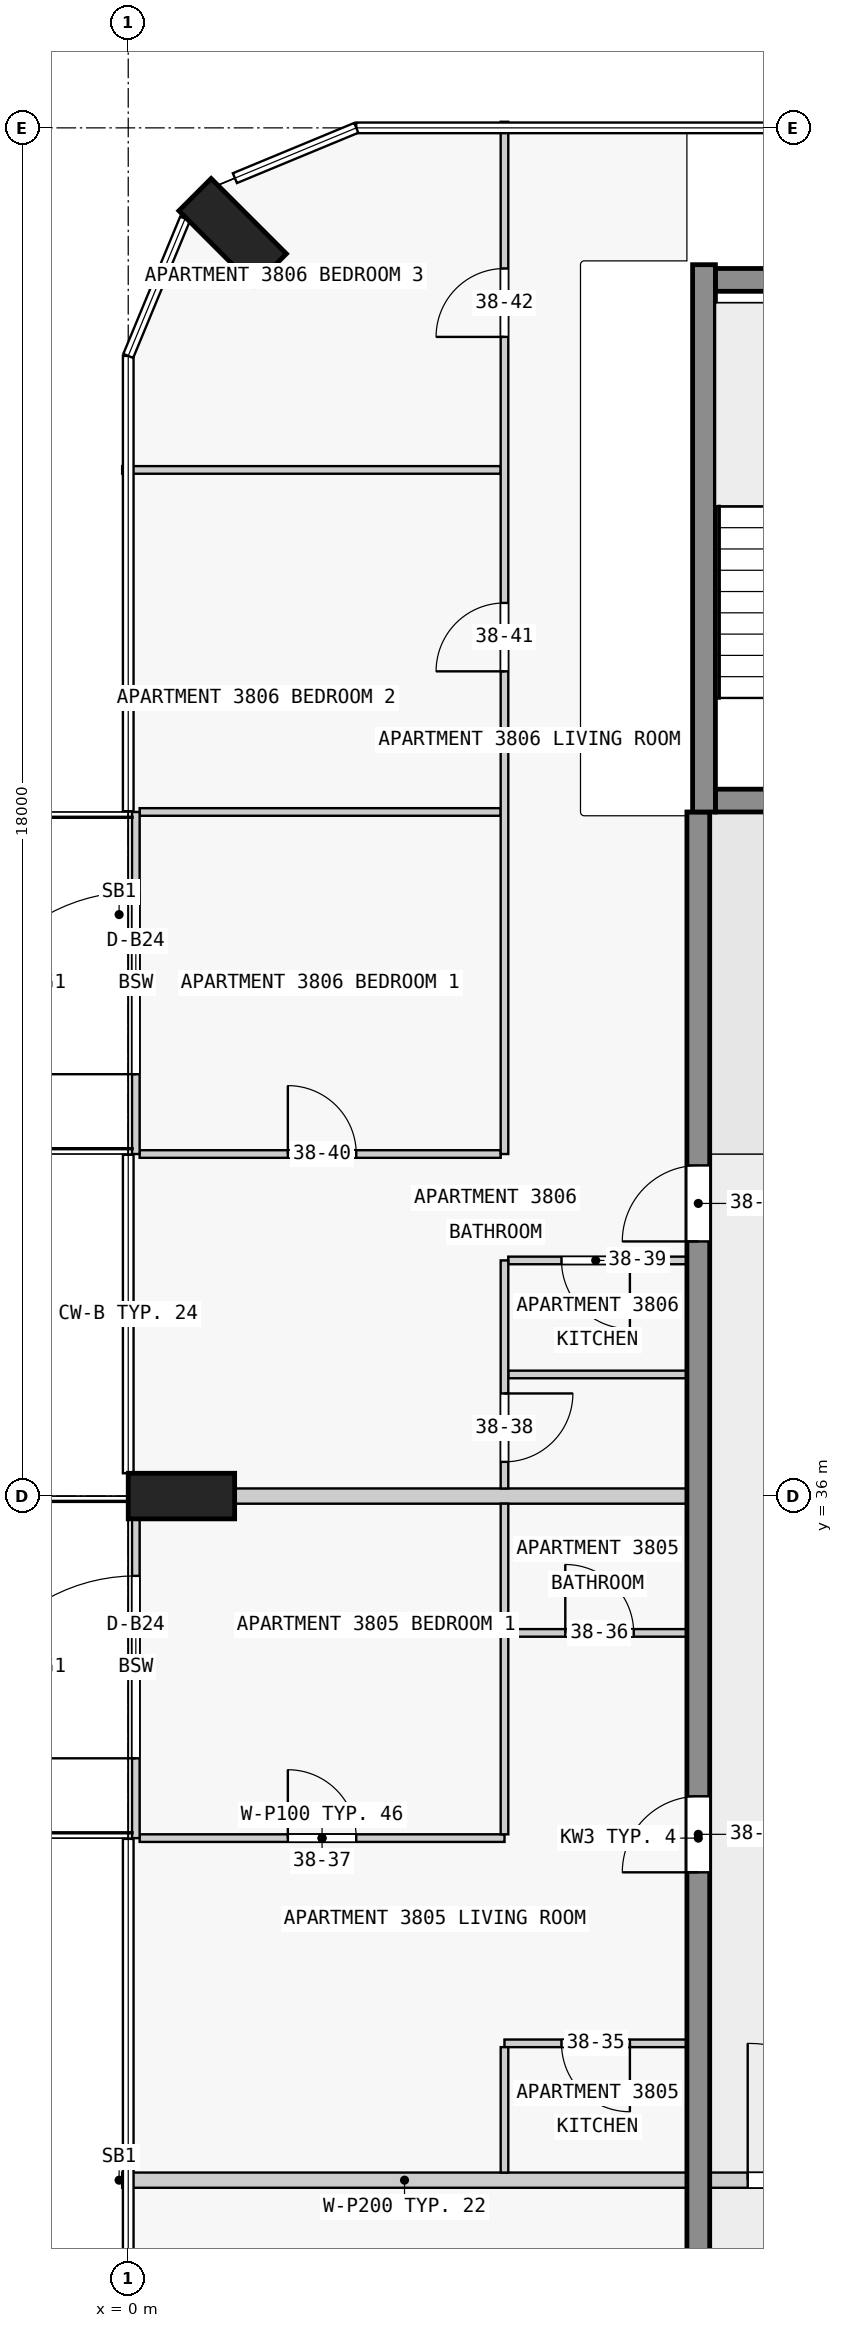
"""IFC4 building model, lengths in metres.
Left out: names, types, materials, properties, quantities, classifications, styles, units other than length and angle.
Written with IfcOpenShell. Run it as: python <this file> out.ifc"""

import sys

from ifc_helpers import new_model, si_unit, direction, frame, frame_2d, origin, origin_2d, place, context, subcontext, project, spatial, rectangle, extrude, element, fill, save


model = new_model("IFC4")
c1 = context("Model", 3, precision=1e-05, world=origin(), true_north=direction((0.0, 1.0)))
c2 = subcontext(c1, "Body", "Model", "MODEL_VIEW")
j1 = project(units=[si_unit("LENGTHUNIT", "METRE"), si_unit("PLANEANGLEUNIT", "RADIAN")], contexts=[c1])
p1 = place(None, origin())
s1 = spatial("IfcSite", under=j1, at=p1, CompositionType="ELEMENT")
p2 = place(p1, origin())
s2 = spatial("IfcBuilding", under=s1, at=p2, CompositionType="ELEMENT")
p3 = place(p2, frame((0.0, 0.0, 149.9)))
s3 = spatial("IfcBuildingStorey", under=s2, at=p3, CompositionType="ELEMENT", Elevation=149.9)
for number, where, z_axis, x_axis in (
    (1, (1.374, 52.626, 0.0), (0.0, 0.0, 1.0), (0.707, 0.707, 0.0)),
    (2, (0.7, 36.0, 0.0), (0.0, 0.0, 1.0), (0.0, 1.0, 0.0)),
):
    element("IfcColumn", number, at=place(p3, frame(where, z_axis=z_axis, x_axis=x_axis)), inside=s3, PredefinedType="COLUMN", context=c2, shape_type="SweptSolid", body=[
        extrude(rectangle(XDim=0.6, YDim=1.4, at=origin_2d()), origin(), (0.0, 0.0, 1.0), 3.5),
    ])
p4 = place(p3, frame((7.725, 45.15, 0.0), z_axis=(0.0, 0.0, 1.0), x_axis=(1.0, 0.0, 0.0)))
e3 = element("IfcWall", 3, at=p4, inside=s3, PredefinedType="SHEAR", context=c2, shape_type="SweptSolid", body=[
    extrude(rectangle(XDim=2.55, YDim=0.3, at=frame_2d((1.275, 0.0))), origin(), (0.0, 0.0, 1.0), 3.5),
])
p5 = place(p4, frame((0.725, 0.0, 0.0)))
e4 = element("IfcOpeningElement", 4, at=p5, cuts=e3, PredefinedType="OPENING", context=c2, shape_type="SweptSolid", body=[
    extrude(rectangle(XDim=1.1, YDim=2.1, at=frame_2d((0.55, 1.05))), frame((0.0, 0.16, 0.0), z_axis=(0.0, -1.0, 0.0), x_axis=(1.0, 0.0, 0.0)), (0.0, 0.0, 1.0), 0.32),
])
p6 = place(p3, frame((7.725, 52.0, 0.0), z_axis=(0.0, 0.0, 1.0), x_axis=(1.0, 0.0, 0.0)))
e5 = element("IfcWall", 5, at=p6, inside=s3, PredefinedType="SHEAR", context=c2, shape_type="SweptSolid", body=[
    extrude(rectangle(XDim=2.55, YDim=0.3, at=frame_2d((1.275, 0.0))), origin(), (0.0, 0.0, 1.0), 3.5),
])
p7 = place(p3, frame((7.575, 45.0, 0.0), z_axis=(0.0, 0.0, 1.0), x_axis=(0.0, 1.0, 0.0)))
e6 = element("IfcWall", 6, at=p7, inside=s3, PredefinedType="SHEAR", context=c2, shape_type="SweptSolid", body=[
    extrude(rectangle(XDim=7.2, YDim=0.3, at=frame_2d((3.6, 0.0))), origin(), (0.0, 0.0, 1.0), 3.5),
])
p8 = place(p3, frame((7.5, 18.0, 0.0), z_axis=(0.0, 0.0, 1.0), x_axis=(0.0, 1.0, 0.0)))
e7 = element("IfcWall", 7, at=p8, inside=s3, PredefinedType="SHEAR", context=c2, shape_type="SweptSolid", body=[
    extrude(rectangle(XDim=27.0, YDim=0.3, at=frame_2d((13.5, 0.0))), origin(), (0.0, 0.0, 1.0), 3.25),
])
p9 = place(p8, frame((1.75, 0.0, 0.0)))
e8 = element("IfcOpeningElement", 8, at=p9, cuts=e7, PredefinedType="OPENING", context=c2, shape_type="SweptSolid", body=[
    extrude(rectangle(XDim=1.0, YDim=2.1, at=frame_2d((0.5, 1.05))), frame((0.0, 0.16, 0.0), z_axis=(0.0, -1.0, 0.0), x_axis=(1.0, 0.0, 0.0)), (0.0, 0.0, 1.0), 0.32),
])
p10 = place(p8, frame((5.85, 0.0, 0.0)))
e9 = element("IfcOpeningElement", 9, at=p10, cuts=e7, PredefinedType="OPENING", context=c2, shape_type="SweptSolid", body=[
    extrude(rectangle(XDim=1.8, YDim=2.1, at=frame_2d((0.9, 1.05))), frame((0.0, 0.16, 0.0), z_axis=(0.0, -1.0, 0.0), x_axis=(1.0, 0.0, 0.0)), (0.0, 0.0, 1.0), 0.32),
])
p11 = place(p8, frame((13.05, 0.0, 0.0)))
e10 = element("IfcOpeningElement", 10, at=p11, cuts=e7, PredefinedType="OPENING", context=c2, shape_type="SweptSolid", body=[
    extrude(rectangle(XDim=1.0, YDim=2.1, at=frame_2d((0.5, 1.05))), frame((0.0, 0.16, 0.0), z_axis=(0.0, -1.0, 0.0), x_axis=(1.0, 0.0, 0.0)), (0.0, 0.0, 1.0), 0.32),
])
p12 = place(p8, frame((21.35, 0.0, 0.0)))
e11 = element("IfcOpeningElement", 11, at=p12, cuts=e7, PredefinedType="OPENING", context=c2, shape_type="SweptSolid", body=[
    extrude(rectangle(XDim=1.0, YDim=2.1, at=frame_2d((0.5, 1.05))), frame((0.0, 0.16, 0.0), z_axis=(0.0, -1.0, 0.0), x_axis=(1.0, 0.0, 0.0)), (0.0, 0.0, 1.0), 0.32),
])
p13 = place(p3, frame((0.1, 31.5, 0.0), z_axis=(0.0, 0.0, 1.0), x_axis=(0.0, 1.0, 0.0)))
e12 = element("IfcWall", 12, at=p13, inside=s3, PredefinedType="STANDARD", context=c2, shape_type="SweptSolid", body=[
    extrude(rectangle(XDim=4.5, YDim=0.1, at=frame_2d((2.25, 0.0))), origin(), (0.0, 0.0, 1.0), 3.25),
])
p14 = place(p13, frame((1.05, 0.0, 0.0)))
e13 = element("IfcOpeningElement", 13, at=p14, cuts=e12, PredefinedType="OPENING", context=c2, shape_type="SweptSolid", body=[
    extrude(rectangle(XDim=2.4, YDim=2.4, at=frame_2d((1.2, 1.2))), frame((0.0, 0.06, 0.0), z_axis=(0.0, -1.0, 0.0), x_axis=(1.0, 0.0, 0.0)), (0.0, 0.0, 1.0), 0.12),
])
p15 = place(p3, frame((0.1, 40.5, 0.0), z_axis=(0.0, 0.0, 1.0), x_axis=(0.0, 1.0, 0.0)))
e14 = element("IfcWall", 14, at=p15, inside=s3, PredefinedType="STANDARD", context=c2, shape_type="SweptSolid", body=[
    extrude(rectangle(XDim=4.5, YDim=0.1, at=frame_2d((2.25, 0.0))), origin(), (0.0, 0.0, 1.0), 3.25),
])
p16 = place(p15, frame((1.05, 0.0, 0.0)))
e15 = element("IfcOpeningElement", 15, at=p16, cuts=e14, PredefinedType="OPENING", context=c2, shape_type="SweptSolid", body=[
    extrude(rectangle(XDim=2.4, YDim=2.4, at=frame_2d((1.2, 1.2))), frame((0.0, 0.06, 0.0), z_axis=(0.0, -1.0, 0.0), x_axis=(1.0, 0.0, 0.0)), (0.0, 0.0, 1.0), 0.12),
])
p17 = place(p3, frame((7.35, 27.0, 0.0), z_axis=(0.0, 0.0, 1.0), x_axis=(-1.0, 0.0, 0.0)))
e16 = element("IfcWall", 16, at=p17, inside=s3, PredefinedType="PARTITIONING", context=c2, shape_type="SweptSolid", body=[
    extrude(rectangle(XDim=7.43, YDim=0.2, at=frame_2d((3.715, 0.0))), origin(), (0.0, 0.0, 1.0), 3.25),
])
p18 = place(p3, frame((7.35, 28.8, 0.0), z_axis=(0.0, 0.0, 1.0), x_axis=(-1.0, 0.0, 0.0)))
e17 = element("IfcWall", 17, at=p18, inside=s3, PredefinedType="PARTITIONING", context=c2, shape_type="SweptSolid", body=[
    extrude(rectangle(XDim=2.4, YDim=0.1, at=frame_2d((1.2, 0.0))), origin(), (0.0, 0.0, 1.0), 3.25),
])
p19 = place(p18, frame((0.75, 0.0, 0.0)))
e18 = element("IfcOpeningElement", 18, at=p19, cuts=e17, PredefinedType="OPENING", context=c2, shape_type="SweptSolid", body=[
    extrude(rectangle(XDim=0.9, YDim=2.1, at=frame_2d((0.45, 1.05))), frame((0.0, 0.06, 0.0), z_axis=(0.0, -1.0, 0.0), x_axis=(1.0, 0.0, 0.0)), (0.0, 0.0, 1.0), 0.12),
])
p20 = place(p3, frame((0.15, 31.5, 0.0), z_axis=(0.0, 0.0, 1.0), x_axis=(1.0, 0.0, 0.0)))
e19 = element("IfcWall", 19, at=p20, inside=s3, PredefinedType="PARTITIONING", context=c2, shape_type="SweptSolid", body=[
    extrude(rectangle(XDim=4.8, YDim=0.1, at=frame_2d((2.4, 0.0))), origin(), (0.0, 0.0, 1.0), 3.25),
])
p21 = place(p20, frame((1.95, 0.0, 0.0)))
e20 = element("IfcOpeningElement", 20, at=p21, cuts=e19, PredefinedType="OPENING", context=c2, shape_type="SweptSolid", body=[
    extrude(rectangle(XDim=0.9, YDim=2.1, at=frame_2d((0.45, 1.05))), frame((0.0, 0.06, 0.0), z_axis=(0.0, -1.0, 0.0), x_axis=(1.0, 0.0, 0.0)), (0.0, 0.0, 1.0), 0.12),
])
p22 = place(p3, frame((5.0, 34.2, 0.0), z_axis=(0.0, 0.0, 1.0), x_axis=(1.0, 0.0, 0.0)))
e21 = element("IfcWall", 21, at=p22, inside=s3, PredefinedType="PARTITIONING", context=c2, shape_type="SweptSolid", body=[
    extrude(rectangle(XDim=2.35, YDim=0.1, at=frame_2d((1.175, 0.0))), origin(), (0.0, 0.0, 1.0), 3.25),
])
p23 = place(p22, frame((0.75, 0.0, 0.0)))
e22 = element("IfcOpeningElement", 22, at=p23, cuts=e21, PredefinedType="OPENING", context=c2, shape_type="SweptSolid", body=[
    extrude(rectangle(XDim=0.9, YDim=2.1, at=frame_2d((0.45, 1.05))), frame((0.0, 0.06, 0.0), z_axis=(0.0, -1.0, 0.0), x_axis=(1.0, 0.0, 0.0)), (0.0, 0.0, 1.0), 0.12),
])
p24 = place(p3, frame((7.35, 36.0, 0.0), z_axis=(0.0, 0.0, 1.0), x_axis=(-1.0, 0.0, 0.0)))
e23 = element("IfcWall", 23, at=p24, inside=s3, PredefinedType="PARTITIONING", context=c2, shape_type="SweptSolid", body=[
    extrude(rectangle(XDim=5.95, YDim=0.2, at=frame_2d((2.975, 0.0))), origin(), (0.0, 0.0, 1.0), 3.25),
])
p25 = place(p3, frame((7.35, 37.6, 0.0), z_axis=(0.0, 0.0, 1.0), x_axis=(-1.0, 0.0, 0.0)))
e24 = element("IfcWall", 24, at=p25, inside=s3, PredefinedType="PARTITIONING", context=c2, shape_type="SweptSolid", body=[
    extrude(rectangle(XDim=2.35, YDim=0.1, at=frame_2d((1.175, 0.0))), origin(), (0.0, 0.0, 1.0), 3.25),
])
p26 = place(p3, frame((7.35, 39.1, 0.0), z_axis=(0.0, 0.0, 1.0), x_axis=(-1.0, 0.0, 0.0)))
e25 = element("IfcWall", 25, at=p26, inside=s3, PredefinedType="PARTITIONING", context=c2, shape_type="SweptSolid", body=[
    extrude(rectangle(XDim=2.35, YDim=0.1, at=frame_2d((1.175, 0.0))), origin(), (0.0, 0.0, 1.0), 3.25),
])
p27 = place(p26, frame((0.75, 0.0, 0.0)))
e26 = element("IfcOpeningElement", 26, at=p27, cuts=e25, PredefinedType="OPENING", context=c2, shape_type="SweptSolid", body=[
    extrude(rectangle(XDim=0.9, YDim=2.1, at=frame_2d((0.45, 1.05))), frame((0.0, 0.06, 0.0), z_axis=(0.0, -1.0, 0.0), x_axis=(1.0, 0.0, 0.0)), (0.0, 0.0, 1.0), 0.12),
])
p28 = place(p3, frame((0.15, 40.5, 0.0), z_axis=(0.0, 0.0, 1.0), x_axis=(1.0, 0.0, 0.0)))
e27 = element("IfcWall", 27, at=p28, inside=s3, PredefinedType="PARTITIONING", context=c2, shape_type="SweptSolid", body=[
    extrude(rectangle(XDim=4.75, YDim=0.1, at=frame_2d((2.375, 0.0))), origin(), (0.0, 0.0, 1.0), 3.25),
])
p29 = place(p28, frame((1.95, 0.0, 0.0)))
e28 = element("IfcOpeningElement", 28, at=p29, cuts=e27, PredefinedType="OPENING", context=c2, shape_type="SweptSolid", body=[
    extrude(rectangle(XDim=0.9, YDim=2.1, at=frame_2d((0.45, 1.05))), frame((0.0, 0.06, 0.0), z_axis=(0.0, -1.0, 0.0), x_axis=(1.0, 0.0, 0.0)), (0.0, 0.0, 1.0), 0.12),
])
p30 = place(p3, frame((4.9, 45.0, 0.0), z_axis=(0.0, 0.0, 1.0), x_axis=(-1.0, 0.0, 0.0)))
e29 = element("IfcWall", 29, at=p30, inside=s3, PredefinedType="PARTITIONING", context=c2, shape_type="SweptSolid", body=[
    extrude(rectangle(XDim=4.75, YDim=0.1, at=frame_2d((2.375, 0.0))), origin(), (0.0, 0.0, 1.0), 3.25),
])
p31 = place(p3, frame((4.9, 49.5, 0.0), z_axis=(0.0, 0.0, 1.0), x_axis=(-1.0, 0.0, 0.0)))
e30 = element("IfcWall", 30, at=p31, inside=s3, PredefinedType="PARTITIONING", context=c2, shape_type="SweptSolid", body=[
    extrude(rectangle(XDim=4.98, YDim=0.1, at=frame_2d((2.49, 0.0))), origin(), (0.0, 0.0, 1.0), 3.25),
])
p32 = place(p3, frame((4.95, 28.75, 0.0), z_axis=(0.0, 0.0, 1.0), x_axis=(0.0, -1.0, 0.0)))
e31 = element("IfcWall", 31, at=p32, inside=s3, PredefinedType="PARTITIONING", context=c2, shape_type="SweptSolid", body=[
    extrude(rectangle(XDim=1.65, YDim=0.1, at=frame_2d((0.825, 0.0))), origin(), (0.0, 0.0, 1.0), 3.25),
])
p33 = place(p3, frame((4.95, 35.9, 0.0), z_axis=(0.0, 0.0, 1.0), x_axis=(0.0, -1.0, 0.0)))
e32 = element("IfcWall", 32, at=p33, inside=s3, PredefinedType="PARTITIONING", context=c2, shape_type="SweptSolid", body=[
    extrude(rectangle(XDim=1.7, YDim=0.1, at=frame_2d((0.85, 0.0))), origin(), (0.0, 0.0, 1.0), 3.25),
])
p34 = place(p3, frame((4.95, 39.1, 0.0), z_axis=(0.0, 0.0, 1.0), x_axis=(0.0, -1.0, 0.0)))
e33 = element("IfcWall", 33, at=p34, inside=s3, PredefinedType="PARTITIONING", context=c2, shape_type="SweptSolid", body=[
    extrude(rectangle(XDim=3.0, YDim=0.1, at=frame_2d((1.5, 0.0))), origin(), (0.0, 0.0, 1.0), 3.25),
])
p35 = place(p34, frame((1.75, 0.0, 0.0)))
e34 = element("IfcOpeningElement", 34, at=p35, cuts=e33, PredefinedType="OPENING", context=c2, shape_type="SweptSolid", body=[
    extrude(rectangle(XDim=0.9, YDim=2.1, at=frame_2d((0.45, 1.05))), frame((0.0, 0.06, 0.0), z_axis=(0.0, -1.0, 0.0), x_axis=(1.0, 0.0, 0.0)), (0.0, 0.0, 1.0), 0.12),
])
p36 = place(p3, frame((4.95, 31.55, 0.0), z_axis=(0.0, 0.0, 1.0), x_axis=(0.0, 1.0, 0.0)))
e35 = element("IfcWall", 35, at=p36, inside=s3, PredefinedType="PARTITIONING", context=c2, shape_type="SweptSolid", body=[
    extrude(rectangle(XDim=2.6, YDim=0.1, at=frame_2d((1.3, 0.0))), origin(), (0.0, 0.0, 1.0), 3.25),
])
p37 = place(p3, frame((4.95, 40.5, 0.0), z_axis=(0.0, 0.0, 1.0), x_axis=(0.0, 1.0, 0.0)))
e36 = element("IfcWall", 36, at=p37, inside=s3, PredefinedType="PARTITIONING", context=c2, shape_type="SweptSolid", body=[
    extrude(rectangle(XDim=13.58, YDim=0.1, at=frame_2d((6.79, 0.0))), origin(), (0.0, 0.0, 1.0), 3.25),
])
p38 = place(p37, frame((6.35, 0.0, 0.0)))
e37 = element("IfcOpeningElement", 37, at=p38, cuts=e36, PredefinedType="OPENING", context=c2, shape_type="SweptSolid", body=[
    extrude(rectangle(XDim=0.9, YDim=2.1, at=frame_2d((0.45, 1.05))), frame((0.0, 0.06, 0.0), z_axis=(0.0, -1.0, 0.0), x_axis=(1.0, 0.0, 0.0)), (0.0, 0.0, 1.0), 0.12),
])
p39 = place(p37, frame((10.75, 0.0, 0.0)))
e38 = element("IfcOpeningElement", 38, at=p39, cuts=e36, PredefinedType="OPENING", context=c2, shape_type="SweptSolid", body=[
    extrude(rectangle(XDim=0.9, YDim=2.1, at=frame_2d((0.45, 1.05))), frame((0.0, 0.06, 0.0), z_axis=(0.0, -1.0, 0.0), x_axis=(1.0, 0.0, 0.0)), (0.0, 0.0, 1.0), 0.12),
])
p40 = place(p3, frame((7.45, 27.0, 0.0), z_axis=(0.0, 0.0, 1.0), x_axis=(1.0, 0.0, 0.0)))
e39 = element("IfcWall", 39, at=p40, inside=s3, PredefinedType="PARTITIONING", context=c2, shape_type="SweptSolid", body=[
    extrude(rectangle(XDim=3.2, YDim=0.2, at=frame_2d((1.6, 0.0))), origin(), (0.0, 0.0, 1.0), 3.25),
])
p41 = place(p40, frame((0.7, 0.0, 0.0)))
e40 = element("IfcOpeningElement", 40, at=p41, cuts=e39, PredefinedType="OPENING", context=c2, shape_type="SweptSolid", body=[
    extrude(rectangle(XDim=1.8, YDim=2.1, at=frame_2d((0.9, 1.05))), frame((0.0, 0.11, 0.0), z_axis=(0.0, -1.0, 0.0), x_axis=(1.0, 0.0, 0.0)), (0.0, 0.0, 1.0), 0.22),
])
p42 = place(p14, origin())
e41 = element("IfcDoor", 41, at=p42, inside=s3, OperationType="SINGLE_SWING_LEFT", PredefinedType="DOOR", context=c2, shape_type="SweptSolid", body=[
    extrude(rectangle(XDim=2.4, YDim=2.4, at=frame_2d((1.2, 1.2))), frame((0.0, 0.025, 0.0), z_axis=(0.0, -1.0, 0.0), x_axis=(1.0, 0.0, 0.0)), (0.0, 0.0, 1.0), 0.05),
])
fill(e13, e41)
p43 = place(p16, origin())
e42 = element("IfcDoor", 42, at=p43, inside=s3, OperationType="SINGLE_SWING_LEFT", PredefinedType="DOOR", context=c2, shape_type="SweptSolid", body=[
    extrude(rectangle(XDim=2.4, YDim=2.4, at=frame_2d((1.2, 1.2))), frame((0.0, 0.025, 0.0), z_axis=(0.0, -1.0, 0.0), x_axis=(1.0, 0.0, 0.0)), (0.0, 0.0, 1.0), 0.05),
])
fill(e15, e42)
p44 = place(p11, origin())
e43 = element("IfcDoor", 43, at=p44, inside=s3, OperationType="SINGLE_SWING_RIGHT", PredefinedType="DOOR", context=c2, shape_type="SweptSolid", body=[
    extrude(rectangle(XDim=1.0, YDim=2.1, at=frame_2d((0.5, 1.05))), frame((0.0, 0.025, 0.0), z_axis=(0.0, -1.0, 0.0), x_axis=(1.0, 0.0, 0.0)), (0.0, 0.0, 1.0), 0.05),
])
fill(e10, e43)
p45 = place(p12, origin())
e44 = element("IfcDoor", 44, at=p45, inside=s3, OperationType="SINGLE_SWING_RIGHT", PredefinedType="DOOR", context=c2, shape_type="SweptSolid", body=[
    extrude(rectangle(XDim=1.0, YDim=2.1, at=frame_2d((0.5, 1.05))), frame((0.0, 0.025, 0.0), z_axis=(0.0, -1.0, 0.0), x_axis=(1.0, 0.0, 0.0)), (0.0, 0.0, 1.0), 0.05),
])
fill(e11, e44)
p46 = place(p41, origin())
e45 = element("IfcDoor", 45, at=p46, inside=s3, OperationType="SINGLE_SWING_LEFT", PredefinedType="DOOR", context=c2, shape_type="SweptSolid", body=[
    extrude(rectangle(XDim=1.8, YDim=2.1, at=frame_2d((0.9, 1.05))), frame((0.0, 0.025, 0.0), z_axis=(0.0, -1.0, 0.0), x_axis=(1.0, 0.0, 0.0)), (0.0, 0.0, 1.0), 0.05),
])
fill(e40, e45)
p47 = place(p19, origin())
e46 = element("IfcDoor", 46, at=p47, inside=s3, OperationType="SINGLE_SWING_RIGHT", PredefinedType="DOOR", context=c2, shape_type="SweptSolid", body=[
    extrude(rectangle(XDim=0.9, YDim=2.1, at=frame_2d((0.45, 1.05))), frame((0.0, 0.025, 0.0), z_axis=(0.0, -1.0, 0.0), x_axis=(1.0, 0.0, 0.0)), (0.0, 0.0, 1.0), 0.05),
])
fill(e18, e46)
p48 = place(p23, origin())
e47 = element("IfcDoor", 47, at=p48, inside=s3, OperationType="SINGLE_SWING_RIGHT", PredefinedType="DOOR", context=c2, shape_type="SweptSolid", body=[
    extrude(rectangle(XDim=0.9, YDim=2.1, at=frame_2d((0.45, 1.05))), frame((0.0, 0.025, 0.0), z_axis=(0.0, -1.0, 0.0), x_axis=(1.0, 0.0, 0.0)), (0.0, 0.0, 1.0), 0.05),
])
fill(e22, e47)
p49 = place(p21, origin())
e48 = element("IfcDoor", 48, at=p49, inside=s3, OperationType="SINGLE_SWING_LEFT", PredefinedType="DOOR", context=c2, shape_type="SweptSolid", body=[
    extrude(rectangle(XDim=0.9, YDim=2.1, at=frame_2d((0.45, 1.05))), frame((0.0, 0.025, 0.0), z_axis=(0.0, -1.0, 0.0), x_axis=(1.0, 0.0, 0.0)), (0.0, 0.0, 1.0), 0.05),
])
fill(e20, e48)
p50 = place(p35, origin())
e49 = element("IfcDoor", 49, at=p50, inside=s3, OperationType="SINGLE_SWING_RIGHT", PredefinedType="DOOR", context=c2, shape_type="SweptSolid", body=[
    extrude(rectangle(XDim=0.9, YDim=2.1, at=frame_2d((0.45, 1.05))), frame((0.0, 0.025, 0.0), z_axis=(0.0, -1.0, 0.0), x_axis=(1.0, 0.0, 0.0)), (0.0, 0.0, 1.0), 0.05),
])
fill(e34, e49)
p51 = place(p27, origin())
e50 = element("IfcDoor", 50, at=p51, inside=s3, OperationType="SINGLE_SWING_RIGHT", PredefinedType="DOOR", context=c2, shape_type="SweptSolid", body=[
    extrude(rectangle(XDim=0.9, YDim=2.1, at=frame_2d((0.45, 1.05))), frame((0.0, 0.025, 0.0), z_axis=(0.0, -1.0, 0.0), x_axis=(1.0, 0.0, 0.0)), (0.0, 0.0, 1.0), 0.05),
])
fill(e26, e50)
p52 = place(p29, origin())
e51 = element("IfcDoor", 51, at=p52, inside=s3, OperationType="SINGLE_SWING_RIGHT", PredefinedType="DOOR", context=c2, shape_type="SweptSolid", body=[
    extrude(rectangle(XDim=0.9, YDim=2.1, at=frame_2d((0.45, 1.05))), frame((0.0, 0.025, 0.0), z_axis=(0.0, -1.0, 0.0), x_axis=(1.0, 0.0, 0.0)), (0.0, 0.0, 1.0), 0.05),
])
fill(e28, e51)
p53 = place(p38, origin())
e52 = element("IfcDoor", 52, at=p53, inside=s3, OperationType="SINGLE_SWING_RIGHT", PredefinedType="DOOR", context=c2, shape_type="SweptSolid", body=[
    extrude(rectangle(XDim=0.9, YDim=2.1, at=frame_2d((0.45, 1.05))), frame((0.0, 0.025, 0.0), z_axis=(0.0, -1.0, 0.0), x_axis=(1.0, 0.0, 0.0)), (0.0, 0.0, 1.0), 0.05),
])
fill(e37, e52)
p54 = place(p39, origin())
e53 = element("IfcDoor", 53, at=p54, inside=s3, OperationType="SINGLE_SWING_RIGHT", PredefinedType="DOOR", context=c2, shape_type="SweptSolid", body=[
    extrude(rectangle(XDim=0.9, YDim=2.1, at=frame_2d((0.45, 1.05))), frame((0.0, 0.025, 0.0), z_axis=(0.0, -1.0, 0.0), x_axis=(1.0, 0.0, 0.0)), (0.0, 0.0, 1.0), 0.05),
])
fill(e38, e53)
save(model, sys.argv[1])
